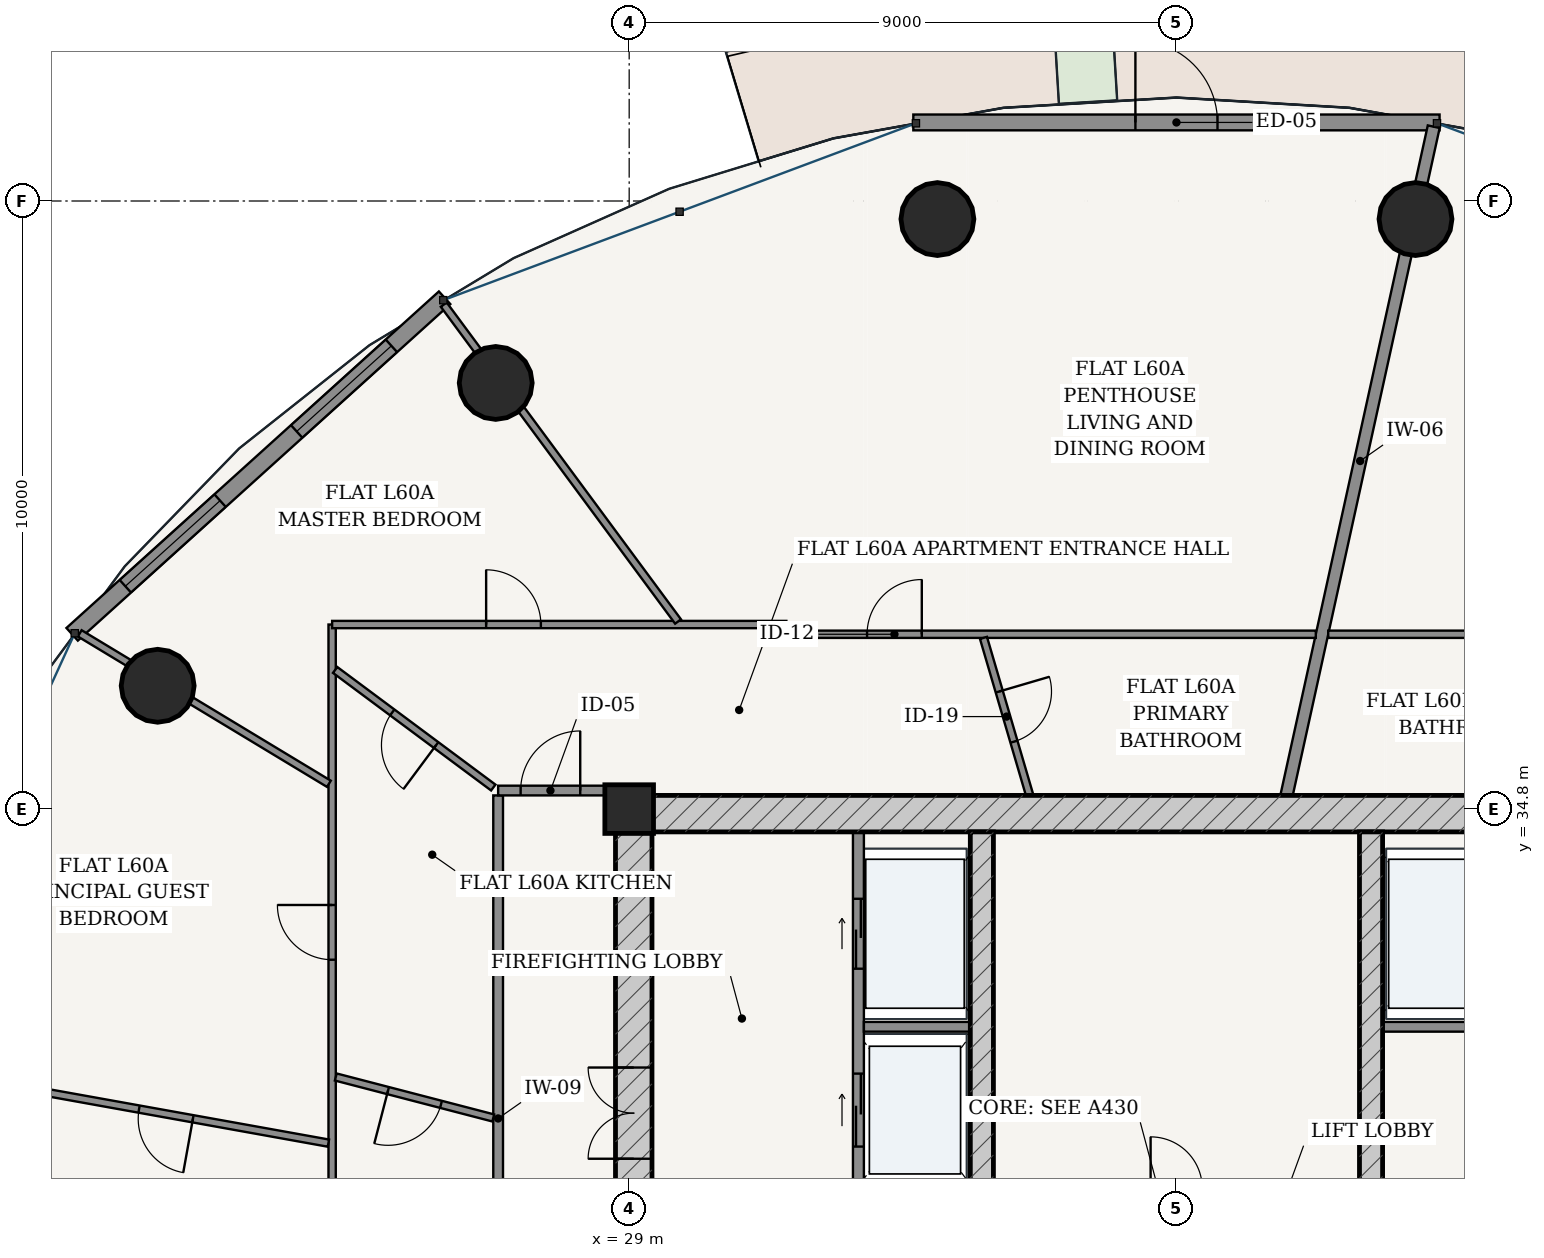
"""IFC4 building model, lengths in metres.
Left out: names, types, materials, properties, quantities, classifications, styles, units other than length and angle.
Written with IfcOpenShell. Run it as: python <this file> out.ifc"""

import sys

from ifc_helpers import new_model, si_unit, direction, frame, frame_2d, origin, origin_2d, place, context, subcontext, project, spatial, rectangle, hollow_circle, extrude, source, transform, mapped, element, fill, save


model = new_model("IFC4")
c1 = context("Model", 3, precision=1e-05, world=origin(), true_north=direction((-0.2419218956, 0.970295726276)))
c2 = subcontext(c1, "Body", "Model", "MODEL_VIEW")
j1 = project(units=[si_unit("LENGTHUNIT", "METRE"), si_unit("PLANEANGLEUNIT", "RADIAN")], contexts=[c1])
p1 = place(None, origin())
s1 = spatial("IfcSite", under=j1, at=p1, CompositionType="ELEMENT")
p2 = place(p1, origin())
s2 = spatial("IfcBuilding", under=s1, at=p2, CompositionType="ELEMENT")
p3 = place(p2, frame((0.0, 0.0, 228.2)))
s3 = spatial("IfcBuildingStorey", under=s2, at=p3, CompositionType="ELEMENT", Elevation=228.2)
p4 = place(p3, frame((29.0, 34.8, 0.0), z_axis=(0.0, 0.0, 1.0), x_axis=(1.0, 0.0, 0.0)))
e1 = element("IfcColumn", 1, at=p4, inside=s3, PredefinedType="COLUMN", context=c2, shape_type="SweptSolid", body=[
    extrude(rectangle(XDim=0.8, YDim=0.8, at=origin_2d()), origin(), (0.0, 0.0, 1.0), 3.7),
])
p5 = place(p3, frame((28.775, 34.725, 0.0), z_axis=(0.0, 0.0, 1.0), x_axis=(1.0, 0.0, 0.0)))
e2 = element("IfcWall", 2, at=p5, inside=s3, PredefinedType="SHEAR", context=c2, shape_type="SweptSolid", body=[
    extrude(rectangle(XDim=18.45, YDim=0.6, at=frame_2d((9.225, 0.0))), origin(), (0.0, 0.0, 1.0), 3.435),
])
p6 = place(p3, frame((29.075, 19.175, 0.0), z_axis=(0.0, 0.0, 1.0), x_axis=(0.0, 1.0, 0.0)))
e3 = element("IfcWall", 3, at=p6, inside=s3, PredefinedType="SHEAR", context=c2, shape_type="SweptSolid", body=[
    extrude(rectangle(XDim=15.25, YDim=0.6, at=frame_2d((7.625, 0.0))), origin(), (0.0, 0.0, 1.0), 3.435),
])
p7 = place(p6, frame((9.875, 0.0, 0.0)))
e4 = element("IfcOpeningElement", 4, at=p7, cuts=e3, PredefinedType="OPENING", context=c2, shape_type="SweptSolid", body=[
    extrude(rectangle(XDim=1.5, YDim=2.2, at=frame_2d((0.75, 1.1))), frame((0.0, 0.31, 0.0), z_axis=(0.0, -1.0, 0.0), x_axis=(1.0, 0.0, 0.0)), (0.0, 0.0, 1.0), 0.62),
])
p8 = place(p3, frame((34.8, 19.175, 0.0), z_axis=(0.0, 0.0, 1.0), x_axis=(0.0, 1.0, 0.0)))
e5 = element("IfcWall", 5, at=p8, inside=s3, PredefinedType="SHEAR", context=c2, shape_type="SweptSolid", body=[
    extrude(rectangle(XDim=15.25, YDim=0.38, at=frame_2d((7.625, 0.0))), origin(), (0.0, 0.0, 1.0), 3.435),
])
p9 = place(p8, frame((7.8, 0.0, 0.0)))
e6 = element("IfcOpeningElement", 6, at=p9, cuts=e5, PredefinedType="OPENING", context=c2, shape_type="SweptSolid", body=[
    extrude(rectangle(XDim=1.05, YDim=2.15, at=frame_2d((0.525, 1.075))), frame((0.0, 0.2, 0.0), z_axis=(0.0, -1.0, 0.0), x_axis=(1.0, 0.0, 0.0)), (0.0, 0.0, 1.0), 0.4),
])
p10 = place(p3, frame((41.2, 19.175, 0.0), z_axis=(0.0, 0.0, 1.0), x_axis=(0.0, 1.0, 0.0)))
e7 = element("IfcWall", 7, at=p10, inside=s3, PredefinedType="SHEAR", context=c2, shape_type="SweptSolid", body=[
    extrude(rectangle(XDim=15.25, YDim=0.38, at=frame_2d((7.625, 0.0))), origin(), (0.0, 0.0, 1.0), 3.435),
])
p11 = place(p10, frame((7.8, 0.0, 0.0)))
e8 = element("IfcOpeningElement", 8, at=p11, cuts=e7, PredefinedType="OPENING", context=c2, shape_type="SweptSolid", body=[
    extrude(rectangle(XDim=1.05, YDim=2.15, at=frame_2d((0.525, 1.075))), frame((0.0, 0.2, 0.0), z_axis=(0.0, -1.0, 0.0), x_axis=(1.0, 0.0, 0.0)), (0.0, 0.0, 1.0), 0.4),
])
for number, where, z_axis, x_axis in (
    (9, (41.931, 44.503, 0.0), (0.0, 0.0, 1.0), (1.0, 0.0, 0.0)),
    (10, (34.069, 44.503, 0.0), (0.0, 0.0, 1.0), (1.0, 0.0, 0.0)),
    (11, (26.805, 41.808, 0.0), (0.0, 0.0, 1.0), (1.0, 0.0, 0.0)),
    (12, (21.246, 36.828, 0.0), (0.0, 0.0, 1.0), (1.0, 0.0, 0.0)),
):
    element("IfcColumn", number, at=place(p3, frame(where, z_axis=z_axis, x_axis=x_axis)), inside=s3, PredefinedType="COLUMN", context=c2, shape_type="SweptSolid", body=[
        extrude(hollow_circle(Radius=0.6, WallThickness=0.038, at=origin_2d()), origin(), (0.0, 0.0, 1.0), 3.7),
    ])
p12 = place(p3, frame((42.327, 46.092, 0.0), z_axis=(0.0, 0.0, 1.0), x_axis=(-1.0, 0.0, 0.0)))
e13 = element("IfcWall", 13, at=p12, inside=s3, PredefinedType="SOLIDWALL", context=c2, shape_type="SweptSolid", body=[
    extrude(rectangle(XDim=8.654, YDim=0.26, at=frame_2d((4.327, 0.0))), origin(), (0.0, 0.0, 1.0), 3.435),
])
p13 = place(p12, frame((3.652, 0.0, 0.0)))
e14 = element("IfcOpeningElement", 14, at=p13, cuts=e13, PredefinedType="OPENING", context=c2, shape_type="SweptSolid", body=[
    extrude(rectangle(XDim=1.35, YDim=2.2, at=frame_2d((0.675, 1.1))), frame((0.0, 0.14, 0.0), z_axis=(0.0, -1.0, 0.0), x_axis=(1.0, 0.0, 0.0)), (0.0, 0.0, 1.0), 0.28),
])
p14 = place(p3, frame((25.965, 43.209, 0.0), z_axis=(0.0, 0.0, 1.0), x_axis=(-0.741972126783, -0.670430729514, 0.0)))
e15 = element("IfcWall", 15, at=p14, inside=s3, PredefinedType="SOLIDWALL", context=c2, shape_type="SweptSolid", body=[
    extrude(rectangle(XDim=8.255, YDim=0.28, at=frame_2d((4.127, 0.0))), origin(), (0.0, 0.0, 1.0), 3.435),
])
p15 = place(p14, frame((1.179, 0.0, 0.85)))
e16 = element("IfcOpeningElement", 16, at=p15, cuts=e15, PredefinedType="OPENING", context=c2, shape_type="SweptSolid", body=[
    extrude(rectangle(XDim=2.1, YDim=1.95, at=frame_2d((1.05, 0.975))), frame((0.0, 0.15, 0.0), z_axis=(0.0, -1.0, 0.0), x_axis=(1.0, 0.0, 0.0)), (0.0, 0.0, 1.0), 0.3),
])
p16 = place(p14, frame((4.976, 0.0, 0.85)))
e17 = element("IfcOpeningElement", 17, at=p16, cuts=e15, PredefinedType="OPENING", context=c2, shape_type="SweptSolid", body=[
    extrude(rectangle(XDim=2.1, YDim=1.95, at=frame_2d((1.05, 0.975))), frame((0.0, 0.15, 0.0), z_axis=(0.0, -1.0, 0.0), x_axis=(1.0, 0.0, 0.0)), (0.0, 0.0, 1.0), 0.3),
])
p17 = place(p3, frame((32.77, 28.52, 0.0), z_axis=(0.0, 0.0, 1.0), x_axis=(0.0, 1.0, 0.0)))
e18 = element("IfcWall", 18, at=p17, inside=s3, PredefinedType="PARTITIONING", context=c2, shape_type="SweptSolid", body=[
    extrude(rectangle(XDim=5.905, YDim=0.18, at=frame_2d((2.953, 0.0))), origin(), (0.0, 0.0, 1.0), 3.435),
])
p18 = place(p17, frame((3.655, 0.0, 0.0)))
e19 = element("IfcOpeningElement", 19, at=p18, cuts=e18, PredefinedType="OPENING", context=c2, shape_type="SweptSolid", body=[
    extrude(rectangle(XDim=1.15, YDim=2.2, at=frame_2d((0.575, 1.1))), frame((0.0, 0.1, 0.0), z_axis=(0.0, -1.0, 0.0), x_axis=(1.0, 0.0, 0.0)), (0.0, 0.0, 1.0), 0.2),
])
p19 = place(p17, frame((0.73, 0.0, 0.0)))
e20 = element("IfcOpeningElement", 20, at=p19, cuts=e18, PredefinedType="OPENING", context=c2, shape_type="SweptSolid", body=[
    extrude(rectangle(XDim=1.2, YDim=2.25, at=frame_2d((0.6, 1.125))), frame((0.0, 0.1, 0.0), z_axis=(0.0, -1.0, 0.0), x_axis=(1.0, 0.0, 0.0)), (0.0, 0.0, 1.0), 0.2),
])
for number, where, z_axis, x_axis in (
    (21, (32.86, 31.22, 0.0), (0.0, 0.0, 1.0), (1.0, 0.0, 0.0)),
    (22, (41.39, 31.22, 0.0), (0.0, 0.0, 1.0), (1.0, 0.0, 0.0)),
):
    element("IfcWall", number, at=place(p3, frame(where, z_axis=z_axis, x_axis=x_axis)), inside=s3, PredefinedType="PARTITIONING", context=c2, shape_type="SweptSolid", body=[
        extrude(rectangle(XDim=1.75, YDim=0.16, at=frame_2d((0.875, 0.0))), origin(), (0.0, 0.0, 1.0), 3.435),
    ])
p20 = place(p3, frame((26.845, 24.4, 0.0), z_axis=(0.0, 0.0, 1.0), x_axis=(0.0, 1.0, 0.0)))
e23 = element("IfcWall", 23, at=p20, inside=s3, PredefinedType="PARTITIONING", context=c2, shape_type="SweptSolid", body=[
    extrude(rectangle(XDim=10.625, YDim=0.16, at=frame_2d((5.312, 0.0))), origin(), (0.0, 0.0, 1.0), 2.951),
])
p21 = place(p3, frame((26.845, 35.105, 0.0), z_axis=(0.0, 0.0, 1.0), x_axis=(1.0, 0.0, 0.0)))
e24 = element("IfcWall", 24, at=p21, inside=s3, PredefinedType="PARTITIONING", context=c2, shape_type="SweptSolid", body=[
    extrude(rectangle(XDim=1.93, YDim=0.16, at=frame_2d((0.965, 0.0))), origin(), (0.0, 0.0, 1.0), 3.435),
])
p22 = place(p21, frame((0.37, 0.0, 0.0)))
e25 = element("IfcOpeningElement", 25, at=p22, cuts=e24, PredefinedType="OPENING", context=c2, shape_type="SweptSolid", body=[
    extrude(rectangle(XDim=0.98, YDim=2.2, at=frame_2d((0.49, 1.1))), frame((0.0, 0.09, 0.0), z_axis=(0.0, -1.0, 0.0), x_axis=(1.0, 0.0, 0.0)), (0.0, 0.0, 1.0), 0.18),
])
p23 = place(p3, frame((39.811, 35.027, 0.0), z_axis=(0.0, 0.0, 1.0), x_axis=(0.214966857327, 0.976621344356, 0.0)))
e26 = element("IfcWall", 26, at=p23, inside=s3, PredefinedType="PARTITIONING", context=c2, shape_type="SweptSolid", body=[
    extrude(rectangle(XDim=11.258, YDim=0.2, at=frame_2d((5.629, 0.0))), origin(), (0.0, 0.0, 1.0), 2.52),
])
p24 = place(p3, frame((24.115, 21.59, 0.0), z_axis=(0.0, 0.0, 1.0), x_axis=(0.0, 1.0, 0.0)))
e27 = element("IfcWall", 27, at=p24, inside=s3, PredefinedType="PARTITIONING", context=c2, shape_type="SweptSolid", body=[
    extrude(rectangle(XDim=16.245, YDim=0.12, at=frame_2d((8.123, 0.0))), origin(), (0.0, 0.0, 1.0), 2.951),
])
p25 = place(p24, frame((10.733, 0.0, 0.0)))
e28 = element("IfcOpeningElement", 28, at=p25, cuts=e27, PredefinedType="OPENING", context=c2, shape_type="SweptSolid", body=[
    extrude(rectangle(XDim=0.9, YDim=2.15, at=frame_2d((0.45, 1.075))), frame((0.0, 0.07, 0.0), z_axis=(0.0, -1.0, 0.0), x_axis=(1.0, 0.0, 0.0)), (0.0, 0.0, 1.0), 0.14),
])
p26 = place(p3, frame((24.115, 37.835, 0.0), z_axis=(0.0, 0.0, 1.0), x_axis=(1.0, 0.0, 0.0)))
e29 = element("IfcWall", 29, at=p26, inside=s3, PredefinedType="PARTITIONING", context=c2, shape_type="SweptSolid", body=[
    extrude(rectangle(XDim=7.47, YDim=0.12, at=frame_2d((3.735, 0.0))), origin(), (0.0, 0.0, 1.0), 2.951),
])
p27 = place(p26, frame((2.533, 0.0, 0.0)))
e30 = element("IfcOpeningElement", 30, at=p27, cuts=e29, PredefinedType="OPENING", context=c2, shape_type="SweptSolid", body=[
    extrude(rectangle(XDim=0.9, YDim=2.15, at=frame_2d((0.45, 1.075))), frame((0.0, 0.07, 0.0), z_axis=(0.0, -1.0, 0.0), x_axis=(1.0, 0.0, 0.0)), (0.0, 0.0, 1.0), 0.14),
])
p28 = place(p3, frame((31.585, 37.675, 0.0), z_axis=(0.0, 0.0, 1.0), x_axis=(1.0, 0.0, 0.0)))
e31 = element("IfcWall", 31, at=p28, inside=s3, PredefinedType="PARTITIONING", context=c2, shape_type="SweptSolid", body=[
    extrude(rectangle(XDim=8.707, YDim=0.12, at=frame_2d((4.354, 0.0))), origin(), (0.0, 0.0, 1.0), 2.951),
])
p29 = place(p28, frame((1.327, 0.0, 0.0)))
e32 = element("IfcOpeningElement", 32, at=p29, cuts=e31, PredefinedType="OPENING", context=c2, shape_type="SweptSolid", body=[
    extrude(rectangle(XDim=0.9, YDim=2.15, at=frame_2d((0.45, 1.075))), frame((0.0, 0.07, 0.0), z_axis=(0.0, -1.0, 0.0), x_axis=(1.0, 0.0, 0.0)), (0.0, 0.0, 1.0), 0.14),
])
p30 = place(p3, frame((29.804, 37.885, 0.0), z_axis=(0.0, 0.0, 1.0), x_axis=(-0.594507557292, 0.804090022524, 0.0)))
e33 = element("IfcWall", 33, at=p30, inside=s3, PredefinedType="PARTITIONING", context=c2, shape_type="SweptSolid", body=[
    extrude(rectangle(XDim=6.481, YDim=0.12, at=frame_2d((3.241, 0.0))), origin(), (0.0, 0.0, 1.0), 2.951),
])
p31 = place(p3, frame((24.062, 35.216, 0.0), z_axis=(0.0, 0.0, 1.0), x_axis=(-0.856058483833, 0.516878972543, 0.0)))
e34 = element("IfcWall", 34, at=p31, inside=s3, PredefinedType="PARTITIONING", context=c2, shape_type="SweptSolid", body=[
    extrude(rectangle(XDim=4.787, YDim=0.12, at=frame_2d((2.393, 0.0))), origin(), (0.0, 0.0, 1.0), 2.951),
])
p32 = place(p3, frame((24.054, 29.307, 0.0), z_axis=(0.0, 0.0, 1.0), x_axis=(-0.984227185588, 0.176909149424, 0.0)))
e35 = element("IfcWall", 35, at=p32, inside=s3, PredefinedType="PARTITIONING", context=c2, shape_type="SweptSolid", body=[
    extrude(rectangle(XDim=7.448, YDim=0.12, at=frame_2d((3.724, 0.0))), origin(), (0.0, 0.0, 1.0), 2.951),
])
p33 = place(p32, frame((2.264, 0.0, 0.0)))
e36 = element("IfcOpeningElement", 36, at=p33, cuts=e35, PredefinedType="OPENING", context=c2, shape_type="SweptSolid", body=[
    extrude(rectangle(XDim=0.9, YDim=2.15, at=frame_2d((0.45, 1.075))), frame((0.0, 0.07, 0.0), z_axis=(0.0, -1.0, 0.0), x_axis=(1.0, 0.0, 0.0)), (0.0, 0.0, 1.0), 0.14),
])
p34 = place(p3, frame((35.586, 35.027, 0.0), z_axis=(0.0, 0.0, 1.0), x_axis=(-0.281539118681, 0.959549751004, 0.0)))
e37 = element("IfcWall", 37, at=p34, inside=s3, PredefinedType="PARTITIONING", context=c2, shape_type="SweptSolid", body=[
    extrude(rectangle(XDim=2.698, YDim=0.12, at=frame_2d((1.349, 0.0))), origin(), (0.0, 0.0, 1.0), 2.52),
])
p35 = place(p34, frame((0.919, 0.0, 0.0)))
e38 = element("IfcOpeningElement", 38, at=p35, cuts=e37, PredefinedType="OPENING", context=c2, shape_type="SweptSolid", body=[
    extrude(rectangle(XDim=0.86, YDim=2.15, at=frame_2d((0.43, 1.075))), frame((0.0, 0.07, 0.0), z_axis=(0.0, -1.0, 0.0), x_axis=(1.0, 0.0, 0.0)), (0.0, 0.0, 1.0), 0.14),
])
p36 = place(p3, frame((26.765, 35.154, 0.0), z_axis=(0.0, 0.0, 1.0), x_axis=(-0.802434587752, 0.596740087793, 0.0)))
e39 = element("IfcWall", 39, at=p36, inside=s3, PredefinedType="PARTITIONING", context=c2, shape_type="SweptSolid", body=[
    extrude(rectangle(XDim=3.24, YDim=0.12, at=frame_2d((1.62, 0.0))), origin(), (0.0, 0.0, 1.0), 3.11),
])
p37 = place(p36, frame((1.17, 0.0, 0.0)))
e40 = element("IfcOpeningElement", 40, at=p37, cuts=e39, PredefinedType="OPENING", context=c2, shape_type="SweptSolid", body=[
    extrude(rectangle(XDim=0.9, YDim=2.15, at=frame_2d((0.45, 1.075))), frame((0.0, 0.07, 0.0), z_axis=(0.0, -1.0, 0.0), x_axis=(1.0, 0.0, 0.0)), (0.0, 0.0, 1.0), 0.14),
])
p38 = place(p3, frame((26.765, 29.721, 0.0), z_axis=(0.0, 0.0, 1.0), x_axis=(-0.967824284298, 0.251627015092, 0.0)))
e41 = element("IfcWall", 41, at=p38, inside=s3, PredefinedType="PARTITIONING", context=c2, shape_type="SweptSolid", body=[
    extrude(rectangle(XDim=2.676, YDim=0.12, at=frame_2d((1.338, 0.0))), origin(), (0.0, 0.0, 1.0), 3.435),
])
p39 = place(p38, frame((0.888, 0.0, 0.0)))
e42 = element("IfcOpeningElement", 42, at=p39, cuts=e41, PredefinedType="OPENING", context=c2, shape_type="SweptSolid", body=[
    extrude(rectangle(XDim=0.9, YDim=2.15, at=frame_2d((0.45, 1.075))), frame((0.0, 0.07, 0.0), z_axis=(0.0, -1.0, 0.0), x_axis=(1.0, 0.0, 0.0)), (0.0, 0.0, 1.0), 0.14),
])
p40 = place(p3, frame((40.496, 37.675, 0.0), z_axis=(0.0, 0.0, 1.0), x_axis=(1.0, 0.0, 0.0)))
e43 = element("IfcWall", 43, at=p40, inside=s3, PredefinedType="PARTITIONING", context=c2, shape_type="SweptSolid", body=[
    extrude(rectangle(XDim=3.919, YDim=0.12, at=frame_2d((1.959, 0.0))), origin(), (0.0, 0.0, 1.0), 2.951),
])
m1 = source(origin(), c2, "Body", "SweptSolid", [
    extrude(rectangle(XDim=1.35, YDim=2.2, at=frame_2d((0.675, 1.1))), frame((0.0, 0.025, 0.0), z_axis=(0.0, -1.0, 0.0), x_axis=(1.0, 0.0, 0.0)), (0.0, 0.0, 1.0), 0.05),
])
p41 = place(p13, frame((1.35, 0.0, 0.0), z_axis=(0.0, 0.0, 1.0), x_axis=(-1.0, 0.0, 0.0)))
e44 = element("IfcDoor", 44, at=p41, inside=s3, OperationType="SINGLE_SWING_LEFT", PredefinedType="DOOR", context=c2, shape_type="MappedRepresentation", body=[
    mapped(m1, transform((0.0, 0.0, 0.0), scale=1.0)),
])
fill(e14, e44)
m2 = source(origin(), c2, "Body", "SweptSolid", [
    extrude(rectangle(XDim=2.1, YDim=1.95, at=frame_2d((1.05, 0.975))), frame((0.0, 0.03, 0.0), z_axis=(0.0, -1.0, 0.0), x_axis=(1.0, 0.0, 0.0)), (0.0, 0.0, 1.0), 0.06),
])
p42 = place(p15, origin())
e45 = element("IfcWindow", 45, at=p42, inside=s3, PartitioningType="SINGLE_PANEL", PredefinedType="WINDOW", context=c2, shape_type="MappedRepresentation", body=[
    mapped(m2, transform((0.0, 0.0, 0.0), scale=1.0)),
])
fill(e16, e45)
p43 = place(p16, origin())
e46 = element("IfcWindow", 46, at=p43, inside=s3, PartitioningType="SINGLE_PANEL", PredefinedType="WINDOW", context=c2, shape_type="MappedRepresentation", body=[
    mapped(m2, transform((0.0, 0.0, 0.0), scale=1.0)),
])
fill(e17, e46)
m3 = source(origin(), c2, "Body", "SweptSolid", [
    extrude(rectangle(XDim=1.5, YDim=2.2, at=frame_2d((0.75, 1.1))), frame((0.0, 0.025, 0.0), z_axis=(0.0, -1.0, 0.0), x_axis=(1.0, 0.0, 0.0)), (0.0, 0.0, 1.0), 0.05),
])
p44 = place(p7, origin())
e47 = element("IfcDoor", 47, at=p44, inside=s3, OperationType="DOUBLE_DOOR_SINGLE_SWING", PredefinedType="DOOR", context=c2, shape_type="MappedRepresentation", body=[
    mapped(m3, transform((0.0, 0.0, 0.0), scale=1.0)),
])
fill(e4, e47)
m4 = source(origin(), c2, "Body", "SweptSolid", [
    extrude(rectangle(XDim=1.15, YDim=2.2, at=frame_2d((0.575, 1.1))), frame((0.0, 0.025, 0.0), z_axis=(0.0, -1.0, 0.0), x_axis=(1.0, 0.0, 0.0)), (0.0, 0.0, 1.0), 0.05),
])
p45 = place(p18, origin())
e48 = element("IfcDoor", 48, at=p45, inside=s3, OperationType="DOUBLE_DOOR_SLIDING", PredefinedType="DOOR", context=c2, shape_type="MappedRepresentation", body=[
    mapped(m4, transform((0.0, 0.0, 0.0), scale=1.0)),
])
fill(e19, e48)
m5 = source(origin(), c2, "Body", "SweptSolid", [
    extrude(rectangle(XDim=1.2, YDim=2.25, at=frame_2d((0.6, 1.125))), frame((0.0, 0.025, 0.0), z_axis=(0.0, -1.0, 0.0), x_axis=(1.0, 0.0, 0.0)), (0.0, 0.0, 1.0), 0.05),
])
p46 = place(p19, origin())
e49 = element("IfcDoor", 49, at=p46, inside=s3, OperationType="DOUBLE_DOOR_SLIDING", PredefinedType="DOOR", context=c2, shape_type="MappedRepresentation", body=[
    mapped(m5, transform((0.0, 0.0, 0.0), scale=1.0)),
])
fill(e20, e49)
m6 = source(origin(), c2, "Body", "SweptSolid", [
    extrude(rectangle(XDim=0.98, YDim=2.2, at=frame_2d((0.49, 1.1))), frame((0.0, 0.025, 0.0), z_axis=(0.0, -1.0, 0.0), x_axis=(1.0, 0.0, 0.0)), (0.0, 0.0, 1.0), 0.05),
])
p47 = place(p22, origin())
e50 = element("IfcDoor", 50, at=p47, inside=s3, OperationType="SINGLE_SWING_RIGHT", PredefinedType="DOOR", context=c2, shape_type="MappedRepresentation", body=[
    mapped(m6, transform((0.0, 0.0, 0.0), scale=1.0)),
])
fill(e25, e50)
m7 = source(origin(), c2, "Body", "SweptSolid", [
    extrude(rectangle(XDim=0.86, YDim=2.15, at=frame_2d((0.43, 1.075))), frame((0.0, 0.025, 0.0), z_axis=(0.0, -1.0, 0.0), x_axis=(1.0, 0.0, 0.0)), (0.0, 0.0, 1.0), 0.05),
])
p48 = place(p35, frame((0.86, 0.0, 0.0), z_axis=(0.0, 0.0, 1.0), x_axis=(-1.0, 0.0, 0.0)))
e51 = element("IfcDoor", 51, at=p48, inside=s3, OperationType="SINGLE_SWING_LEFT", PredefinedType="DOOR", context=c2, shape_type="MappedRepresentation", body=[
    mapped(m7, transform((0.0, 0.0, 0.0), scale=1.0)),
])
fill(e38, e51)
m8 = source(origin(), c2, "Body", "SweptSolid", [
    extrude(rectangle(XDim=0.9, YDim=2.15, at=frame_2d((0.45, 1.075))), frame((0.0, 0.025, 0.0), z_axis=(0.0, -1.0, 0.0), x_axis=(1.0, 0.0, 0.0)), (0.0, 0.0, 1.0), 0.05),
])
p49 = place(p29, origin())
e52 = element("IfcDoor", 52, at=p49, inside=s3, OperationType="SINGLE_SWING_RIGHT", PredefinedType="DOOR", context=c2, shape_type="MappedRepresentation", body=[
    mapped(m8, transform((0.0, 0.0, 0.0), scale=1.0)),
])
fill(e32, e52)
p50 = place(p37, origin())
e53 = element("IfcDoor", 53, at=p50, inside=s3, OperationType="SINGLE_SWING_LEFT", PredefinedType="DOOR", context=c2, shape_type="MappedRepresentation", body=[
    mapped(m8, transform((0.0, 0.0, 0.0), scale=1.0)),
])
fill(e40, e53)
p51 = place(p39, origin())
e54 = element("IfcDoor", 54, at=p51, inside=s3, OperationType="SINGLE_SWING_RIGHT", PredefinedType="DOOR", context=c2, shape_type="MappedRepresentation", body=[
    mapped(m8, transform((0.0, 0.0, 0.0), scale=1.0)),
])
fill(e42, e54)
p52 = place(p27, origin())
e55 = element("IfcDoor", 55, at=p52, inside=s3, OperationType="SINGLE_SWING_LEFT", PredefinedType="DOOR", context=c2, shape_type="MappedRepresentation", body=[
    mapped(m8, transform((0.0, 0.0, 0.0), scale=1.0)),
])
fill(e30, e55)
p53 = place(p25, origin())
e56 = element("IfcDoor", 56, at=p53, inside=s3, OperationType="SINGLE_SWING_RIGHT", PredefinedType="DOOR", context=c2, shape_type="MappedRepresentation", body=[
    mapped(m8, transform((0.0, 0.0, 0.0), scale=1.0)),
])
fill(e28, e56)
p54 = place(p33, origin())
e57 = element("IfcDoor", 57, at=p54, inside=s3, OperationType="SINGLE_SWING_LEFT", PredefinedType="DOOR", context=c2, shape_type="MappedRepresentation", body=[
    mapped(m8, transform((0.0, 0.0, 0.0), scale=1.0)),
])
fill(e36, e57)
save(model, sys.argv[1])
